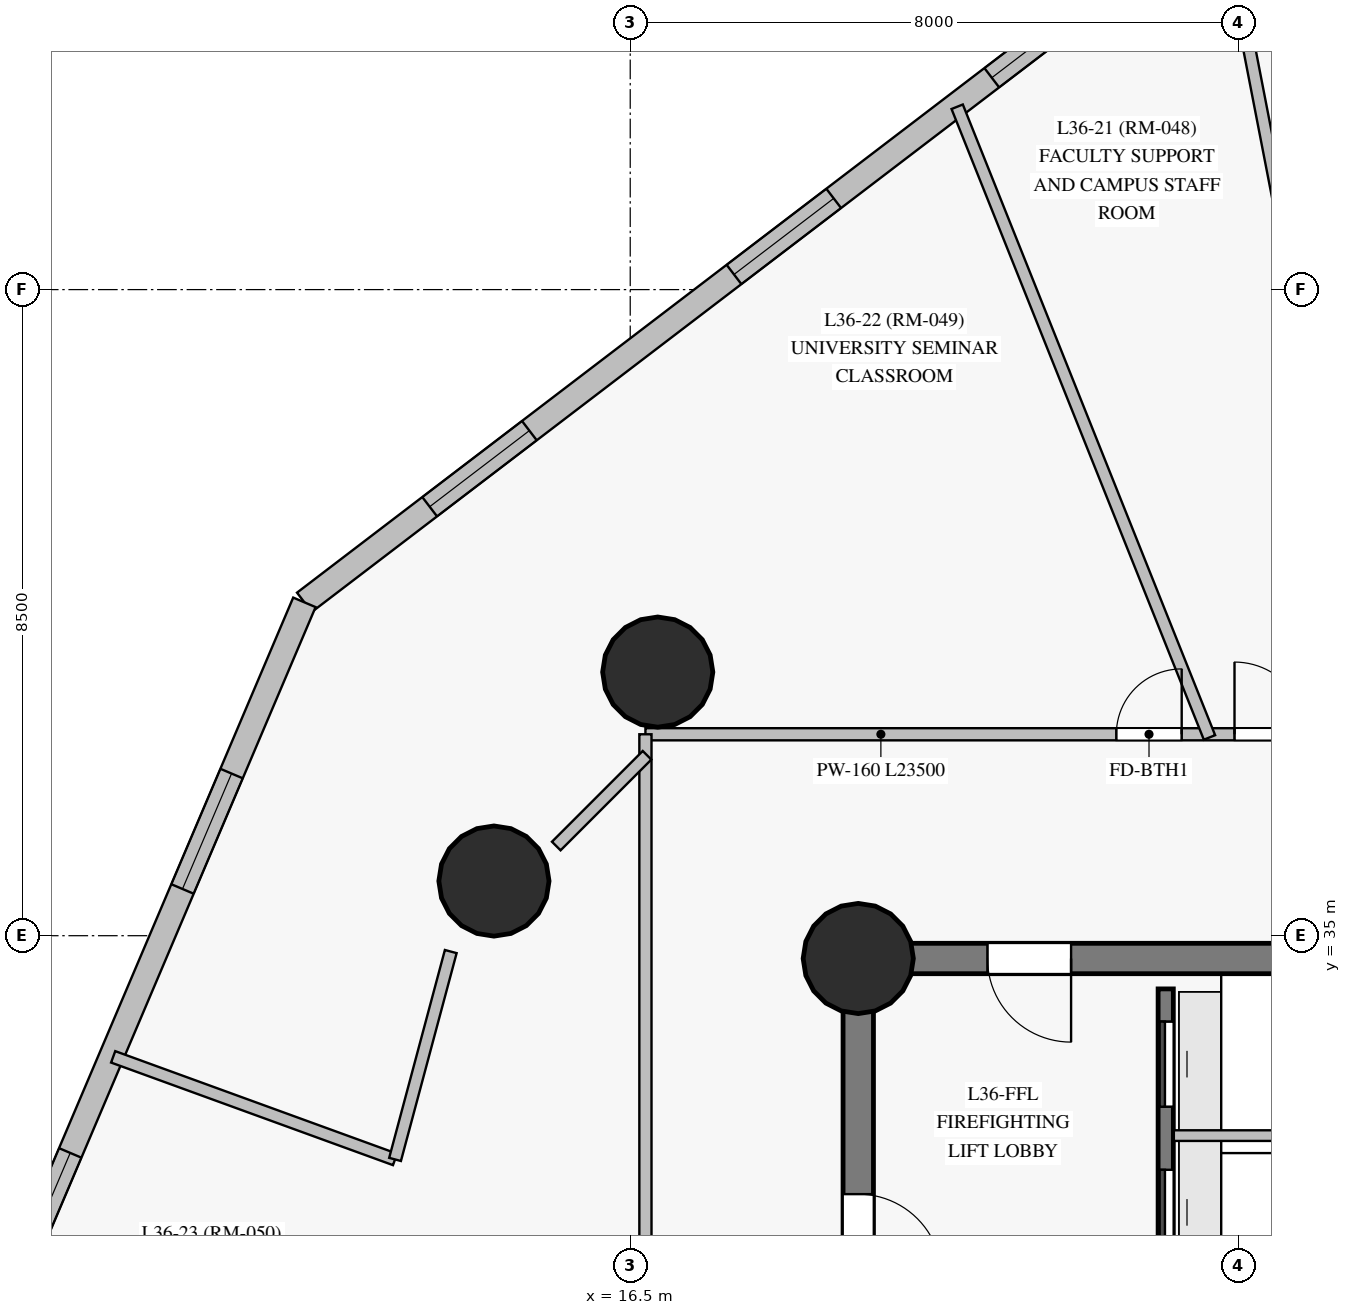
"""IFC4 building model, lengths in metres.
Left out: names, types, materials, properties, quantities, classifications, styles, units other than length and angle.
Written with IfcOpenShell. Run it as: python <this file> out.ifc"""

import sys

from ifc_helpers import new_model, si_unit, direction, frame, frame_2d, origin, origin_with_axes, origin_2d, place, context, subcontext, project, spatial, rectangle, circle, extrude, source, transform, mapped, element, fill, save


model = new_model("IFC4")
c1 = context("Model", 3, precision=1e-05, world=origin(), true_north=direction((0.0, 1.0)))
c2 = subcontext(c1, "Body", "Model", "MODEL_VIEW")
j1 = project(units=[si_unit("LENGTHUNIT", "METRE"), si_unit("PLANEANGLEUNIT", "RADIAN")], contexts=[c1])
p1 = place(None, origin())
s1 = spatial("IfcSite", under=j1, at=p1, CompositionType="ELEMENT")
p2 = place(p1, origin())
s2 = spatial("IfcBuilding", under=s1, at=p2, CompositionType="ELEMENT")
p3 = place(p2, frame((0.0, 0.0, 129.75)))
s3 = spatial("IfcBuildingStorey", under=s2, at=p3, CompositionType="ELEMENT", Elevation=129.75)
p4 = place(p3, frame((26.55, 34.7, 0.0), z_axis=(0.0, 0.0, 1.0), x_axis=(-1.0, 0.0, 0.0)))
e1 = element("IfcWall", 1, at=p4, inside=s3, PredefinedType="SHEAR", context=c2, shape_type="SweptSolid", body=[
    extrude(rectangle(XDim=7.05, YDim=0.4, at=frame_2d((3.525, 0.0))), origin(), (0.0, 0.0, 1.0), 2.825),
])
p5 = place(p4, frame((4.25, 0.0, 0.0)))
e2 = element("IfcOpeningElement", 2, at=p5, cuts=e1, PredefinedType="OPENING", context=c2, shape_type="SweptSolid", body=[
    extrude(rectangle(XDim=1.1, YDim=2.15, at=frame_2d((0.55, 1.075))), frame((0.0, 0.21, 0.0), z_axis=(0.0, -1.0, 0.0), x_axis=(1.0, 0.0, 0.0)), (0.0, 0.0, 1.0), 0.42),
])
p6 = place(p3, frame((19.5, 34.7, 0.0), z_axis=(0.0, 0.0, 1.0), x_axis=(0.0, -1.0, 0.0)))
e3 = element("IfcWall", 3, at=p6, inside=s3, PredefinedType="SHEAR", context=c2, shape_type="SweptSolid", body=[
    extrude(rectangle(XDim=16.4, YDim=0.4, at=frame_2d((8.2, 0.0))), origin(), (0.0, 0.0, 1.0), 2.825),
])
p7 = place(p6, frame((3.1, 0.0, 0.0)))
e4 = element("IfcOpeningElement", 4, at=p7, cuts=e3, PredefinedType="OPENING", context=c2, shape_type="SweptSolid", body=[
    extrude(rectangle(XDim=1.1, YDim=2.15, at=frame_2d((0.55, 1.075))), frame((0.0, 0.21, 0.0), z_axis=(0.0, -1.0, 0.0), x_axis=(1.0, 0.0, 0.0)), (0.0, 0.0, 1.0), 0.42),
])
m1 = source(origin_with_axes(), c2, "Body", "SweptSolid", [
    extrude(circle(Radius=0.725, at=origin_2d()), origin(), (0.0, 0.0, 1.0), 3.05),
])
for number, where, z_axis, x_axis in (
    (5, (19.5, 34.7, 0.0), (0.0, 0.0, 1.0), (1.0, 0.0, 0.0)),
    (6, (16.862, 38.468, 0.0), (0.0, 0.0, 1.0), (1.0, 0.0, 0.0)),
    (7, (14.707, 35.719, 0.0), (0.0, 0.0, 1.0), (1.0, 0.0, 0.0)),
):
    element("IfcColumn", number, at=place(p3, frame(where, z_axis=z_axis, x_axis=x_axis)), inside=s3, PredefinedType="COLUMN", context=c2, shape_type="MappedRepresentation", body=[
        mapped(m1, transform((0.0, 0.0, 0.0), scale=1.0)),
    ])
p8 = place(p3, frame((23.095, 47.69, 0.0), z_axis=(0.0, 0.0, 1.0), x_axis=(-0.794946718948, -0.606679251363, 0.0)))
e8 = element("IfcWall", 8, at=p8, inside=s3, PredefinedType="SOLIDWALL", context=c2, shape_type="SweptSolid", body=[
    extrude(rectangle(XDim=13.689, YDim=0.32, at=frame_2d((6.844, 0.0))), origin(), (0.0, 0.0, 1.0), 2.825),
])
p9 = place(p8, frame((0.663, 0.0, 0.85)))
e9 = element("IfcOpeningElement", 9, at=p9, cuts=e8, PredefinedType="OPENING", context=c2, shape_type="SweptSolid", body=[
    extrude(rectangle(XDim=1.65, YDim=1.65, at=frame_2d((0.825, 0.825))), frame((0.0, 0.17, 0.0), z_axis=(0.0, -1.0, 0.0), x_axis=(1.0, 0.0, 0.0)), (0.0, 0.0, 1.0), 0.34),
])
p10 = place(p8, frame((4.929, 0.0, 0.85)))
e10 = element("IfcOpeningElement", 10, at=p10, cuts=e8, PredefinedType="OPENING", context=c2, shape_type="SweptSolid", body=[
    extrude(rectangle(XDim=1.65, YDim=1.65, at=frame_2d((0.825, 0.825))), frame((0.0, 0.17, 0.0), z_axis=(0.0, -1.0, 0.0), x_axis=(1.0, 0.0, 0.0)), (0.0, 0.0, 1.0), 0.34),
])
p11 = place(p8, frame((9.966, 0.0, 0.85)))
e11 = element("IfcOpeningElement", 11, at=p11, cuts=e8, PredefinedType="OPENING", context=c2, shape_type="SweptSolid", body=[
    extrude(rectangle(XDim=1.65, YDim=1.65, at=frame_2d((0.825, 0.825))), frame((0.0, 0.17, 0.0), z_axis=(0.0, -1.0, 0.0), x_axis=(1.0, 0.0, 0.0)), (0.0, 0.0, 1.0), 0.34),
])
p12 = place(p3, frame((12.213, 39.386, 0.0), z_axis=(0.0, 0.0, 1.0), x_axis=(-0.391384325622, -0.920227314123, 0.0)))
e12 = element("IfcWall", 12, at=p12, inside=s3, PredefinedType="SOLIDWALL", context=c2, shape_type="SweptSolid", body=[
    extrude(rectangle(XDim=10.968, YDim=0.32, at=frame_2d((5.484, 0.0))), origin(), (0.0, 0.0, 1.0), 2.825),
])
p13 = place(p12, frame((2.448, 0.0, 0.85)))
e13 = element("IfcOpeningElement", 13, at=p13, cuts=e12, PredefinedType="OPENING", context=c2, shape_type="SweptSolid", body=[
    extrude(rectangle(XDim=1.65, YDim=1.65, at=frame_2d((0.825, 0.825))), frame((0.0, 0.17, 0.0), z_axis=(0.0, -1.0, 0.0), x_axis=(1.0, 0.0, 0.0)), (0.0, 0.0, 1.0), 0.34),
])
p14 = place(p12, frame((7.871, 0.0, 0.85)))
e14 = element("IfcOpeningElement", 14, at=p14, cuts=e12, PredefinedType="OPENING", context=c2, shape_type="SweptSolid", body=[
    extrude(rectangle(XDim=1.65, YDim=1.65, at=frame_2d((0.825, 0.825))), frame((0.0, 0.17, 0.0), z_axis=(0.0, -1.0, 0.0), x_axis=(1.0, 0.0, 0.0)), (0.0, 0.0, 1.0), 0.34),
])
p15 = place(p3, frame((23.545, 18.7, 0.0), z_axis=(0.0, 0.0, 1.0), x_axis=(0.0, 1.0, 0.0)))
e15 = element("IfcWall", 15, at=p15, inside=s3, PredefinedType="SHEAR", context=c2, shape_type="SweptSolid", body=[
    extrude(rectangle(XDim=15.6, YDim=0.2, at=frame_2d((7.8, 0.0))), origin(), (0.0, 0.0, 1.0), 2.825),
])
p16 = place(p15, frame((2.75, 0.0, 0.0)))
e16 = element("IfcOpeningElement", 16, at=p16, cuts=e15, PredefinedType="OPENING", context=c2, shape_type="SweptSolid", body=[
    extrude(rectangle(XDim=1.15, YDim=2.15, at=frame_2d((0.575, 1.075))), frame((0.0, 0.11, 0.0), z_axis=(0.0, -1.0, 0.0), x_axis=(1.0, 0.0, 0.0)), (0.0, 0.0, 1.0), 0.22),
])
p17 = place(p15, frame((0.14, 0.0, 0.0)))
e17 = element("IfcOpeningElement", 17, at=p17, cuts=e15, PredefinedType="OPENING", context=c2, shape_type="SweptSolid", body=[
    extrude(rectangle(XDim=0.88, YDim=2.1, at=frame_2d((0.44, 1.05))), frame((0.0, 0.11, 0.0), z_axis=(0.0, -1.0, 0.0), x_axis=(1.0, 0.0, 0.0)), (0.0, 0.0, 1.0), 0.22),
])
p18 = place(p15, frame((1.36, 0.0, 0.0)))
e18 = element("IfcOpeningElement", 18, at=p18, cuts=e15, PredefinedType="OPENING", context=c2, shape_type="SweptSolid", body=[
    extrude(rectangle(XDim=0.88, YDim=2.1, at=frame_2d((0.44, 1.05))), frame((0.0, 0.11, 0.0), z_axis=(0.0, -1.0, 0.0), x_axis=(1.0, 0.0, 0.0)), (0.0, 0.0, 1.0), 0.22),
])
p19 = place(p15, frame((12.1, 0.0, 0.0)))
e19 = element("IfcOpeningElement", 19, at=p19, cuts=e15, PredefinedType="OPENING", context=c2, shape_type="SweptSolid", body=[
    extrude(rectangle(XDim=1.12, YDim=2.15, at=frame_2d((0.56, 1.075))), frame((0.0, 0.11, 0.0), z_axis=(0.0, -1.0, 0.0), x_axis=(1.0, 0.0, 0.0)), (0.0, 0.0, 1.0), 0.22),
])
p20 = place(p15, frame((14.05, 0.0, 0.0)))
e20 = element("IfcOpeningElement", 20, at=p20, cuts=e15, PredefinedType="OPENING", context=c2, shape_type="SweptSolid", body=[
    extrude(rectangle(XDim=1.12, YDim=2.15, at=frame_2d((0.56, 1.075))), frame((0.0, 0.11, 0.0), z_axis=(0.0, -1.0, 0.0), x_axis=(1.0, 0.0, 0.0)), (0.0, 0.0, 1.0), 0.22),
])
p21 = place(p3, frame((16.7, 37.65, 0.0), z_axis=(0.0, 0.0, 1.0), x_axis=(1.0, 0.0, 0.0)))
e21 = element("IfcWall", 21, at=p21, inside=s3, PredefinedType="PARTITIONING", context=c2, shape_type="SweptSolid", body=[
    extrude(rectangle(XDim=23.5, YDim=0.16, at=frame_2d((11.75, 0.0))), origin(), (0.0, 0.0, 1.0), 2.325),
])
p22 = place(p21, frame((20.465, 0.0, 0.0)))
e22 = element("IfcOpeningElement", 22, at=p22, cuts=e21, PredefinedType="OPENING", context=c2, shape_type="SweptSolid", body=[
    extrude(rectangle(XDim=0.96, YDim=2.15, at=frame_2d((0.48, 1.075))), frame((0.0, 0.09, 0.0), z_axis=(0.0, -1.0, 0.0), x_axis=(1.0, 0.0, 0.0)), (0.0, 0.0, 1.0), 0.18),
])
p23 = place(p21, frame((17.06, 0.0, 0.0)))
e23 = element("IfcOpeningElement", 23, at=p23, cuts=e21, PredefinedType="OPENING", context=c2, shape_type="SweptSolid", body=[
    extrude(rectangle(XDim=0.95, YDim=2.15, at=frame_2d((0.475, 1.075))), frame((0.0, 0.09, 0.0), z_axis=(0.0, -1.0, 0.0), x_axis=(1.0, 0.0, 0.0)), (0.0, 0.0, 1.0), 0.18),
])
p24 = place(p21, frame((14.71, 0.0, 0.0)))
e24 = element("IfcOpeningElement", 24, at=p24, cuts=e21, PredefinedType="OPENING", context=c2, shape_type="SweptSolid", body=[
    extrude(rectangle(XDim=0.96, YDim=2.15, at=frame_2d((0.48, 1.075))), frame((0.0, 0.09, 0.0), z_axis=(0.0, -1.0, 0.0), x_axis=(1.0, 0.0, 0.0)), (0.0, 0.0, 1.0), 0.18),
])
p25 = place(p21, frame((10.785, 0.0, 0.0)))
e25 = element("IfcOpeningElement", 25, at=p25, cuts=e21, PredefinedType="OPENING", context=c2, shape_type="SweptSolid", body=[
    extrude(rectangle(XDim=0.95, YDim=2.15, at=frame_2d((0.475, 1.075))), frame((0.0, 0.09, 0.0), z_axis=(0.0, -1.0, 0.0), x_axis=(1.0, 0.0, 0.0)), (0.0, 0.0, 1.0), 0.18),
])
p26 = place(p21, frame((7.75, 0.0, 0.0)))
e26 = element("IfcOpeningElement", 26, at=p26, cuts=e21, PredefinedType="OPENING", context=c2, shape_type="SweptSolid", body=[
    extrude(rectangle(XDim=0.95, YDim=2.15, at=frame_2d((0.475, 1.075))), frame((0.0, 0.09, 0.0), z_axis=(0.0, -1.0, 0.0), x_axis=(1.0, 0.0, 0.0)), (0.0, 0.0, 1.0), 0.18),
])
p27 = place(p21, frame((6.195, 0.0, 0.0)))
e27 = element("IfcOpeningElement", 27, at=p27, cuts=e21, PredefinedType="OPENING", context=c2, shape_type="SweptSolid", body=[
    extrude(rectangle(XDim=0.86, YDim=2.1, at=frame_2d((0.43, 1.05))), frame((0.0, 0.09, 0.0), z_axis=(0.0, -1.0, 0.0), x_axis=(1.0, 0.0, 0.0)), (0.0, 0.0, 1.0), 0.18),
])
p28 = place(p3, frame((16.7, 15.35, 0.0), z_axis=(0.0, 0.0, 1.0), x_axis=(0.0, 1.0, 0.0)))
e28 = element("IfcWall", 28, at=p28, inside=s3, PredefinedType="PARTITIONING", context=c2, shape_type="SweptSolid", body=[
    extrude(rectangle(XDim=22.3, YDim=0.16, at=frame_2d((11.15, 0.0))), origin(), (0.0, 0.0, 1.0), 2.225),
])
p29 = place(p28, frame((10.675, 0.0, 0.0)))
e29 = element("IfcOpeningElement", 29, at=p29, cuts=e28, PredefinedType="OPENING", context=c2, shape_type="SweptSolid", body=[
    extrude(rectangle(XDim=0.95, YDim=2.15, at=frame_2d((0.475, 1.075))), frame((0.0, 0.09, 0.0), z_axis=(0.0, -1.0, 0.0), x_axis=(1.0, 0.0, 0.0)), (0.0, 0.0, 1.0), 0.18),
])
p30 = place(p28, frame((2.159, 0.0, 0.0)))
e30 = element("IfcOpeningElement", 30, at=p30, cuts=e28, PredefinedType="OPENING", context=c2, shape_type="SweptSolid", body=[
    extrude(rectangle(XDim=0.95, YDim=2.15, at=frame_2d((0.475, 1.075))), frame((0.0, 0.09, 0.0), z_axis=(0.0, -1.0, 0.0), x_axis=(1.0, 0.0, 0.0)), (0.0, 0.0, 1.0), 0.18),
])
p31 = place(p28, frame((14.02, 0.0, 0.0)))
e31 = element("IfcOpeningElement", 31, at=p31, cuts=e28, PredefinedType="OPENING", context=c2, shape_type="SweptSolid", body=[
    extrude(rectangle(XDim=0.95, YDim=2.15, at=frame_2d((0.475, 1.075))), frame((0.0, 0.09, 0.0), z_axis=(0.0, -1.0, 0.0), x_axis=(1.0, 0.0, 0.0)), (0.0, 0.0, 1.0), 0.18),
])
p32 = place(p3, frame((26.405, 37.606, 0.0), z_axis=(0.0, 0.0, 1.0), x_axis=(-0.19062474147, 0.981662980834, 0.0)))
e32 = element("IfcWall", 32, at=p32, inside=s3, PredefinedType="PARTITIONING", context=c2, shape_type="SweptSolid", body=[
    extrude(rectangle(XDim=10.539, YDim=0.16, at=frame_2d((5.27, 0.0))), origin(), (0.0, 0.0, 1.0), 2.225),
])
p33 = place(p3, frame((24.121, 37.608, 0.0), z_axis=(0.0, 0.0, 1.0), x_axis=(-0.37142835735, 0.9284616176, 0.0)))
e33 = element("IfcWall", 33, at=p33, inside=s3, PredefinedType="PARTITIONING", context=c2, shape_type="SweptSolid", body=[
    extrude(rectangle(XDim=8.937, YDim=0.16, at=frame_2d((4.468, 0.0))), origin(), (0.0, 0.0, 1.0), 2.825),
])
p34 = place(p3, frame((13.406, 32.057, 0.0), z_axis=(0.0, 0.0, 1.0), x_axis=(-0.939706694021, 0.341981474954, 0.0)))
e34 = element("IfcWall", 34, at=p34, inside=s3, PredefinedType="PARTITIONING", context=c2, shape_type="SweptSolid", body=[
    extrude(rectangle(XDim=3.947, YDim=0.16, at=frame_2d((1.973, 0.0))), origin(), (0.0, 0.0, 1.0), 2.825),
])
p35 = place(p3, frame((14.139, 34.792, 0.0), z_axis=(0.0, 0.0, 1.0), x_axis=(-0.258853892004, -0.965916488416, 0.0)))
e35 = element("IfcWall", 35, at=p35, inside=s3, PredefinedType="PARTITIONING", context=c2, shape_type="SweptSolid", body=[
    extrude(rectangle(XDim=2.831, YDim=0.16, at=frame_2d((1.416, 0.0))), origin(), (0.0, 0.0, 1.0), 2.225),
])
p36 = place(p3, frame((23.652, 32.37, 0.0), z_axis=(0.0, 0.0, 1.0), x_axis=(1.0, 0.0, 0.0)))
e36 = element("IfcWall", 36, at=p36, inside=s3, PredefinedType="PARTITIONING", context=c2, shape_type="SweptSolid", body=[
    extrude(rectangle(XDim=2.828, YDim=0.14, at=frame_2d((1.414, 0.0))), origin(), (0.0, 0.0, 1.0), 2.825),
])
p37 = place(p3, frame((16.721, 37.374, 0.0), z_axis=(0.0, 0.0, 1.0), x_axis=(-0.707034498357, -0.707179056627, 0.0)))
e37 = element("IfcWall", 37, at=p37, inside=s3, PredefinedType="PARTITIONING", context=c2, shape_type="SweptSolid", body=[
    extrude(rectangle(XDim=1.689, YDim=0.16, at=frame_2d((0.844, 0.0))), origin(), (0.0, 0.0, 1.0), 2.225),
])
m2 = source(origin_with_axes(), c2, "Body", "SweptSolid", [
    extrude(rectangle(XDim=1.65, YDim=1.65, at=frame_2d((0.825, 0.825))), frame((0.0, 0.03, 0.0), z_axis=(0.0, -1.0, 0.0), x_axis=(1.0, 0.0, 0.0)), (0.0, 0.0, 1.0), 0.06),
])
p38 = place(p9, origin())
e38 = element("IfcWindow", 38, at=p38, inside=s3, PartitioningType="SINGLE_PANEL", PredefinedType="WINDOW", context=c2, shape_type="MappedRepresentation", body=[
    mapped(m2, transform((0.0, 0.0, 0.0), scale=1.0)),
])
fill(e9, e38)
p39 = place(p10, origin())
e39 = element("IfcWindow", 39, at=p39, inside=s3, PartitioningType="SINGLE_PANEL", PredefinedType="WINDOW", context=c2, shape_type="MappedRepresentation", body=[
    mapped(m2, transform((0.0, 0.0, 0.0), scale=1.0)),
])
fill(e10, e39)
p40 = place(p11, origin())
e40 = element("IfcWindow", 40, at=p40, inside=s3, PartitioningType="SINGLE_PANEL", PredefinedType="WINDOW", context=c2, shape_type="MappedRepresentation", body=[
    mapped(m2, transform((0.0, 0.0, 0.0), scale=1.0)),
])
fill(e11, e40)
p41 = place(p13, origin())
e41 = element("IfcWindow", 41, at=p41, inside=s3, PartitioningType="SINGLE_PANEL", PredefinedType="WINDOW", context=c2, shape_type="MappedRepresentation", body=[
    mapped(m2, transform((0.0, 0.0, 0.0), scale=1.0)),
])
fill(e13, e41)
p42 = place(p14, origin())
e42 = element("IfcWindow", 42, at=p42, inside=s3, PartitioningType="SINGLE_PANEL", PredefinedType="WINDOW", context=c2, shape_type="MappedRepresentation", body=[
    mapped(m2, transform((0.0, 0.0, 0.0), scale=1.0)),
])
fill(e14, e42)
m3 = source(origin_with_axes(), c2, "Body", "SweptSolid", [
    extrude(rectangle(XDim=1.1, YDim=2.15, at=frame_2d((0.55, 1.075))), frame((0.0, 0.025, 0.0), z_axis=(0.0, -1.0, 0.0), x_axis=(1.0, 0.0, 0.0)), (0.0, 0.0, 1.0), 0.05),
])
p43 = place(p5, origin())
e43 = element("IfcDoor", 43, at=p43, inside=s3, OperationType="SINGLE_SWING_LEFT", PredefinedType="DOOR", context=c2, shape_type="MappedRepresentation", body=[
    mapped(m3, transform((0.0, 0.0, 0.0), scale=1.0)),
])
fill(e2, e43)
p44 = place(p7, origin())
e44 = element("IfcDoor", 44, at=p44, inside=s3, OperationType="SINGLE_SWING_RIGHT", PredefinedType="DOOR", context=c2, shape_type="MappedRepresentation", body=[
    mapped(m3, transform((0.0, 0.0, 0.0), scale=1.0)),
])
fill(e4, e44)
m4 = source(origin_with_axes(), c2, "Body", "SweptSolid", [
    extrude(rectangle(XDim=1.12, YDim=2.15, at=frame_2d((0.56, 1.075))), frame((0.0, 0.025, 0.0), z_axis=(0.0, -1.0, 0.0), x_axis=(1.0, 0.0, 0.0)), (0.0, 0.0, 1.0), 0.05),
])
p45 = place(p19, origin())
e45 = element("IfcDoor", 45, at=p45, inside=s3, OperationType="SLIDING_TO_LEFT", PredefinedType="DOOR", context=c2, shape_type="MappedRepresentation", body=[
    mapped(m4, transform((0.0, 0.0, 0.0), scale=1.0)),
])
fill(e19, e45)
p46 = place(p20, origin())
e46 = element("IfcDoor", 46, at=p46, inside=s3, OperationType="SLIDING_TO_RIGHT", PredefinedType="DOOR", context=c2, shape_type="MappedRepresentation", body=[
    mapped(m4, transform((0.0, 0.0, 0.0), scale=1.0)),
])
fill(e20, e46)
m5 = source(origin_with_axes(), c2, "Body", "SweptSolid", [
    extrude(rectangle(XDim=0.95, YDim=2.15, at=frame_2d((0.475, 1.075))), frame((0.0, 0.025, 0.0), z_axis=(0.0, -1.0, 0.0), x_axis=(1.0, 0.0, 0.0)), (0.0, 0.0, 1.0), 0.05),
])
p47 = place(p26, origin())
e47 = element("IfcDoor", 47, at=p47, inside=s3, OperationType="SINGLE_SWING_LEFT", PredefinedType="DOOR", context=c2, shape_type="MappedRepresentation", body=[
    mapped(m5, transform((0.0, 0.0, 0.0), scale=1.0)),
])
fill(e26, e47)
m6 = source(origin_with_axes(), c2, "Body", "SweptSolid", [
    extrude(rectangle(XDim=0.86, YDim=2.1, at=frame_2d((0.43, 1.05))), frame((0.0, 0.025, 0.0), z_axis=(0.0, -1.0, 0.0), x_axis=(1.0, 0.0, 0.0)), (0.0, 0.0, 1.0), 0.05),
])
p48 = place(p27, origin())
e48 = element("IfcDoor", 48, at=p48, inside=s3, OperationType="SINGLE_SWING_RIGHT", PredefinedType="DOOR", context=c2, shape_type="MappedRepresentation", body=[
    mapped(m6, transform((0.0, 0.0, 0.0), scale=1.0)),
])
fill(e27, e48)
save(model, sys.argv[1])
